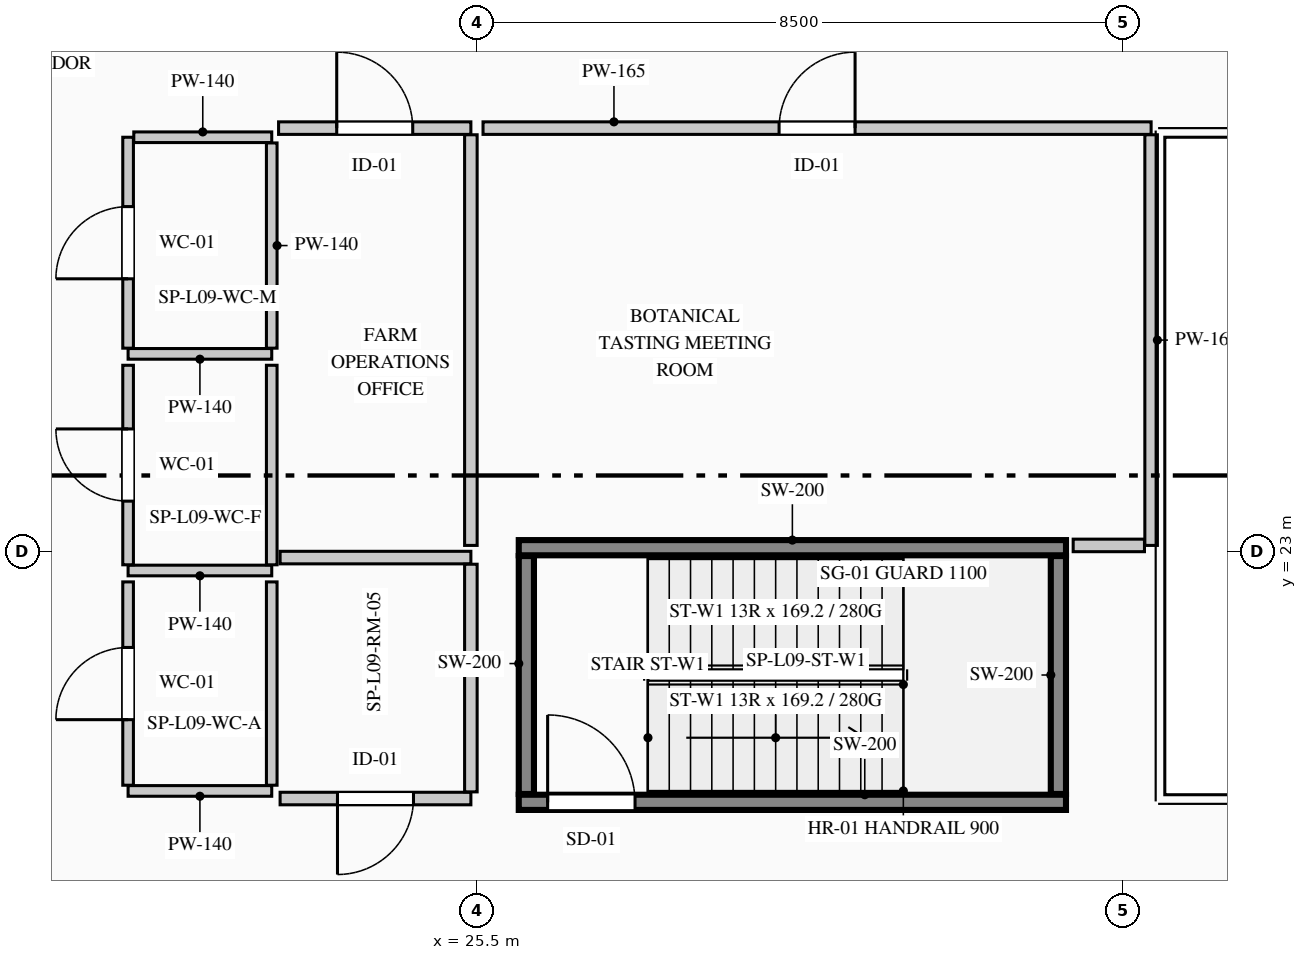
"""IFC4 building model, lengths in metres.
Left out: names, types, materials, properties, quantities, classifications, styles, units other than length and angle.
Written with IfcOpenShell. Run it as: python <this file> out.ifc"""

import sys

from ifc_helpers import new_model, si_unit, direction, frame, frame_2d, origin, place, context, subcontext, project, spatial, rectangle, extrude, element, fill, save


model = new_model("IFC4")
c1 = context("Model", 3, precision=1e-05, world=origin(), true_north=direction((0.0, 1.0)))
c2 = subcontext(c1, "Body", "Model", "MODEL_VIEW")
j1 = project(units=[si_unit("LENGTHUNIT", "METRE"), si_unit("PLANEANGLEUNIT", "RADIAN")], contexts=[c1])
p1 = place(None, origin())
s1 = spatial("IfcSite", under=j1, at=p1, CompositionType="ELEMENT")
p2 = place(p1, origin())
s2 = spatial("IfcBuilding", under=s1, at=p2, CompositionType="ELEMENT")
p3 = place(p2, frame((0.0, 0.0, 40.2)))
s3 = spatial("IfcBuildingStorey", under=s2, at=p3, CompositionType="ELEMENT", Elevation=40.2)
p4 = place(p3, frame((26.05, 19.7, 0.0), z_axis=(0.0, 0.0, 1.0), x_axis=(1.0, 0.0, 0.0)))
e1 = element("IfcWall", 1, at=p4, inside=s3, PredefinedType="SHEAR", context=c2, shape_type="SweptSolid", body=[
    extrude(rectangle(XDim=7.2, YDim=0.2, at=frame_2d((3.6, 0.0))), origin(), (0.0, 0.0, 1.0), 4.4),
])
p5 = place(p4, frame((0.38, 0.0, 0.0)))
e2 = element("IfcOpeningElement", 2, at=p5, cuts=e1, PredefinedType="OPENING", context=c2, shape_type="SweptSolid", body=[
    extrude(rectangle(XDim=1.15, YDim=2.2, at=frame_2d((0.575, 1.1))), frame((0.0, 0.11, 0.0), z_axis=(0.0, -1.0, 0.0), x_axis=(1.0, 0.0, 0.0)), (0.0, 0.0, 1.0), 0.22),
])
p6 = place(p3, frame((26.05, 23.05, 0.0), z_axis=(0.0, 0.0, 1.0), x_axis=(1.0, 0.0, 0.0)))
e3 = element("IfcWall", 3, at=p6, inside=s3, PredefinedType="SHEAR", context=c2, shape_type="SweptSolid", body=[
    extrude(rectangle(XDim=7.2, YDim=0.2, at=frame_2d((3.6, 0.0))), origin(), (0.0, 0.0, 1.0), 4.4),
])
for number, where, z_axis, x_axis in (
    (4, (26.15, 19.81, 0.0), (0.0, 0.0, 1.0), (0.0, 1.0, 0.0)),
    (5, (33.15, 19.81, 0.0), (0.0, 0.0, 1.0), (0.0, 1.0, 0.0)),
):
    element("IfcWall", number, at=place(p3, frame(where, z_axis=z_axis, x_axis=x_axis)), inside=s3, PredefinedType="SHEAR", context=c2, shape_type="SweptSolid", body=[
        extrude(rectangle(XDim=3.13, YDim=0.2, at=frame_2d((1.565, 0.0))), origin(), (0.0, 0.0, 1.0), 4.4),
    ])
p7 = place(p3, frame((22.8, 25.6, 0.0), z_axis=(0.0, 0.0, 1.0), x_axis=(-1.0, 0.0, 0.0)))
e6 = element("IfcWall", 6, at=p7, inside=s3, PredefinedType="PARTITIONING", context=c2, shape_type="SweptSolid", body=[
    extrude(rectangle(XDim=1.89, YDim=0.14, at=frame_2d((0.945, 0.0))), origin(), (0.0, 0.0, 1.0), 4.1),
])
p8 = place(p3, frame((20.91, 25.675, 0.0), z_axis=(0.0, 0.0, 1.0), x_axis=(0.0, 1.0, 0.0)))
e7 = element("IfcWall", 7, at=p8, inside=s3, PredefinedType="PARTITIONING", context=c2, shape_type="SweptSolid", body=[
    extrude(rectangle(XDim=2.775, YDim=0.14, at=frame_2d((1.387, 0.0))), origin(), (0.0, 0.0, 1.0), 4.1),
])
p9 = place(p8, frame((0.913, 0.0, 0.0)))
e8 = element("IfcOpeningElement", 8, at=p9, cuts=e7, PredefinedType="OPENING", context=c2, shape_type="SweptSolid", body=[
    extrude(rectangle(XDim=0.95, YDim=2.15, at=frame_2d((0.475, 1.075))), frame((0.0, 0.08, 0.0), z_axis=(0.0, -1.0, 0.0), x_axis=(1.0, 0.0, 0.0)), (0.0, 0.0, 1.0), 0.16),
])
p10 = place(p3, frame((20.985, 28.45, 0.0), z_axis=(0.0, 0.0, 1.0), x_axis=(1.0, 0.0, 0.0)))
e9 = element("IfcWall", 9, at=p10, inside=s3, PredefinedType="PARTITIONING", context=c2, shape_type="SweptSolid", body=[
    extrude(rectangle(XDim=1.815, YDim=0.14, at=frame_2d((0.907, 0.0))), origin(), (0.0, 0.0, 1.0), 4.1),
])
p11 = place(p3, frame((22.8, 28.375, 0.0), z_axis=(0.0, 0.0, 1.0), x_axis=(0.0, -1.0, 0.0)))
e10 = element("IfcWall", 10, at=p11, inside=s3, PredefinedType="PARTITIONING", context=c2, shape_type="SweptSolid", body=[
    extrude(rectangle(XDim=2.7, YDim=0.14, at=frame_2d((1.35, 0.0))), origin(), (0.0, 0.0, 1.0), 3.785),
])
p12 = place(p3, frame((22.8, 22.75, 0.0), z_axis=(0.0, 0.0, 1.0), x_axis=(-1.0, 0.0, 0.0)))
e11 = element("IfcWall", 11, at=p12, inside=s3, PredefinedType="PARTITIONING", context=c2, shape_type="SweptSolid", body=[
    extrude(rectangle(XDim=1.89, YDim=0.14, at=frame_2d((0.945, 0.0))), origin(), (0.0, 0.0, 1.0), 4.1),
])
p13 = place(p3, frame((20.91, 22.825, 0.0), z_axis=(0.0, 0.0, 1.0), x_axis=(0.0, 1.0, 0.0)))
e12 = element("IfcWall", 12, at=p13, inside=s3, PredefinedType="PARTITIONING", context=c2, shape_type="SweptSolid", body=[
    extrude(rectangle(XDim=2.625, YDim=0.14, at=frame_2d((1.312, 0.0))), origin(), (0.0, 0.0, 1.0), 4.1),
])
p14 = place(p13, frame((0.837, 0.0, 0.0)))
e13 = element("IfcOpeningElement", 13, at=p14, cuts=e12, PredefinedType="OPENING", context=c2, shape_type="SweptSolid", body=[
    extrude(rectangle(XDim=0.95, YDim=2.15, at=frame_2d((0.475, 1.075))), frame((0.0, 0.08, 0.0), z_axis=(0.0, -1.0, 0.0), x_axis=(1.0, 0.0, 0.0)), (0.0, 0.0, 1.0), 0.16),
])
p15 = place(p3, frame((22.8, 25.45, 0.0), z_axis=(0.0, 0.0, 1.0), x_axis=(0.0, -1.0, 0.0)))
e14 = element("IfcWall", 14, at=p15, inside=s3, PredefinedType="PARTITIONING", context=c2, shape_type="SweptSolid", body=[
    extrude(rectangle(XDim=2.625, YDim=0.14, at=frame_2d((1.312, 0.0))), origin(), (0.0, 0.0, 1.0), 3.785),
])
p16 = place(p3, frame((22.8, 19.85, 0.0), z_axis=(0.0, 0.0, 1.0), x_axis=(-1.0, 0.0, 0.0)))
e15 = element("IfcWall", 15, at=p16, inside=s3, PredefinedType="PARTITIONING", context=c2, shape_type="SweptSolid", body=[
    extrude(rectangle(XDim=1.89, YDim=0.14, at=frame_2d((0.945, 0.0))), origin(), (0.0, 0.0, 1.0), 4.1),
])
p17 = place(p3, frame((20.91, 19.925, 0.0), z_axis=(0.0, 0.0, 1.0), x_axis=(0.0, 1.0, 0.0)))
e16 = element("IfcWall", 16, at=p17, inside=s3, PredefinedType="PARTITIONING", context=c2, shape_type="SweptSolid", body=[
    extrude(rectangle(XDim=2.675, YDim=0.14, at=frame_2d((1.337, 0.0))), origin(), (0.0, 0.0, 1.0), 4.1),
])
p18 = place(p17, frame((0.863, 0.0, 0.0)))
e17 = element("IfcOpeningElement", 17, at=p18, cuts=e16, PredefinedType="OPENING", context=c2, shape_type="SweptSolid", body=[
    extrude(rectangle(XDim=0.95, YDim=2.15, at=frame_2d((0.475, 1.075))), frame((0.0, 0.08, 0.0), z_axis=(0.0, -1.0, 0.0), x_axis=(1.0, 0.0, 0.0)), (0.0, 0.0, 1.0), 0.16),
])
p19 = place(p3, frame((22.8, 22.6, 0.0), z_axis=(0.0, 0.0, 1.0), x_axis=(0.0, -1.0, 0.0)))
e18 = element("IfcWall", 18, at=p19, inside=s3, PredefinedType="PARTITIONING", context=c2, shape_type="SweptSolid", body=[
    extrude(rectangle(XDim=2.675, YDim=0.14, at=frame_2d((1.337, 0.0))), origin(), (0.0, 0.0, 1.0), 3.785),
])
p20 = place(p3, frame((25.42, 19.75, 0.0), z_axis=(0.0, 0.0, 1.0), x_axis=(-1.0, 0.0, 0.0)))
e19 = element("IfcWall", 19, at=p20, inside=s3, PredefinedType="PARTITIONING", context=c2, shape_type="SweptSolid", body=[
    extrude(rectangle(XDim=2.51, YDim=0.165, at=frame_2d((1.255, 0.0))), origin(), (0.0, 0.0, 1.0), 4.1),
])
p21 = place(p20, frame((0.755, 0.0, 0.0)))
e20 = element("IfcOpeningElement", 20, at=p21, cuts=e19, PredefinedType="OPENING", context=c2, shape_type="SweptSolid", body=[
    extrude(rectangle(XDim=1.0, YDim=2.15, at=frame_2d((0.5, 1.075))), frame((0.0, 0.093, 0.0), z_axis=(0.0, -1.0, 0.0), x_axis=(1.0, 0.0, 0.0)), (0.0, 0.0, 1.0), 0.185),
])
p22 = place(p3, frame((22.91, 22.92, 0.0), z_axis=(0.0, 0.0, 1.0), x_axis=(1.0, 0.0, 0.0)))
e21 = element("IfcWall", 21, at=p22, inside=s3, PredefinedType="PARTITIONING", context=c2, shape_type="SweptSolid", body=[
    extrude(rectangle(XDim=2.51, YDim=0.165, at=frame_2d((1.255, 0.0))), origin(), (0.0, 0.0, 1.0), 4.1),
])
p23 = place(p3, frame((25.42, 22.833, 0.0), z_axis=(0.0, 0.0, 1.0), x_axis=(0.0, -1.0, 0.0)))
e22 = element("IfcWall", 22, at=p23, inside=s3, PredefinedType="PARTITIONING", context=c2, shape_type="SweptSolid", body=[
    extrude(rectangle(XDim=2.995, YDim=0.165, at=frame_2d((1.498, 0.0))), origin(), (0.0, 0.0, 1.0), 3.285),
])
p24 = place(p3, frame((22.89, 28.57, 0.0), z_axis=(0.0, 0.0, 1.0), x_axis=(1.0, 0.0, 0.0)))
e23 = element("IfcWall", 23, at=p24, inside=s3, PredefinedType="PARTITIONING", context=c2, shape_type="SweptSolid", body=[
    extrude(rectangle(XDim=2.53, YDim=0.165, at=frame_2d((1.265, 0.0))), origin(), (0.0, 0.0, 1.0), 4.1),
])
p25 = place(p24, frame((0.765, 0.0, 0.0)))
e24 = element("IfcOpeningElement", 24, at=p25, cuts=e23, PredefinedType="OPENING", context=c2, shape_type="SweptSolid", body=[
    extrude(rectangle(XDim=1.0, YDim=2.15, at=frame_2d((0.5, 1.075))), frame((0.0, 0.093, 0.0), z_axis=(0.0, -1.0, 0.0), x_axis=(1.0, 0.0, 0.0)), (0.0, 0.0, 1.0), 0.185),
])
p26 = place(p3, frame((25.42, 28.482, 0.0), z_axis=(0.0, 0.0, 1.0), x_axis=(0.0, -1.0, 0.0)))
e25 = element("IfcWall", 25, at=p26, inside=s3, PredefinedType="PARTITIONING", context=c2, shape_type="SweptSolid", body=[
    extrude(rectangle(XDim=5.402, YDim=0.165, at=frame_2d((2.701, 0.0))), origin(), (0.0, 0.0, 1.0), 3.285),
])
p27 = place(p3, frame((25.58, 28.57, 0.0), z_axis=(0.0, 0.0, 1.0), x_axis=(1.0, 0.0, 0.0)))
e26 = element("IfcWall", 26, at=p27, inside=s3, PredefinedType="PARTITIONING", context=c2, shape_type="SweptSolid", body=[
    extrude(rectangle(XDim=8.79, YDim=0.165, at=frame_2d((4.395, 0.0))), origin(), (0.0, 0.0, 1.0), 3.785),
])
p28 = place(p27, frame((3.895, 0.0, 0.0)))
e27 = element("IfcOpeningElement", 27, at=p28, cuts=e26, PredefinedType="OPENING", context=c2, shape_type="SweptSolid", body=[
    extrude(rectangle(XDim=1.0, YDim=2.15, at=frame_2d((0.5, 1.075))), frame((0.0, 0.093, 0.0), z_axis=(0.0, -1.0, 0.0), x_axis=(1.0, 0.0, 0.0)), (0.0, 0.0, 1.0), 0.185),
])
p29 = place(p3, frame((34.37, 28.482, 0.0), z_axis=(0.0, 0.0, 1.0), x_axis=(0.0, -1.0, 0.0)))
e28 = element("IfcWall", 28, at=p29, inside=s3, PredefinedType="PARTITIONING", context=c2, shape_type="SweptSolid", body=[
    extrude(rectangle(XDim=5.402, YDim=0.165, at=frame_2d((2.701, 0.0))), origin(), (0.0, 0.0, 1.0), 4.1),
])
p30 = place(p3, frame((34.282, 23.08, 0.0), z_axis=(0.0, 0.0, 1.0), x_axis=(-1.0, 0.0, 0.0)))
e29 = element("IfcWall", 29, at=p30, inside=s3, PredefinedType="PARTITIONING", context=c2, shape_type="SweptSolid", body=[
    extrude(rectangle(XDim=0.938, YDim=0.165, at=frame_2d((0.469, 0.0))), origin(), (0.0, 0.0, 1.0), 4.1),
])
p31 = place(p5, origin())
e30 = element("IfcDoor", 30, at=p31, inside=s3, OperationType="SINGLE_SWING_LEFT", PredefinedType="DOOR", context=c2, shape_type="SweptSolid", body=[
    extrude(rectangle(XDim=1.15, YDim=2.2, at=frame_2d((0.575, 1.1))), frame((0.0, 0.025, 0.0), z_axis=(0.0, -1.0, 0.0), x_axis=(1.0, 0.0, 0.0)), (0.0, 0.0, 1.0), 0.05),
])
fill(e2, e30)
p32 = place(p9, origin())
e31 = element("IfcDoor", 31, at=p32, inside=s3, OperationType="SINGLE_SWING_LEFT", PredefinedType="DOOR", context=c2, shape_type="SweptSolid", body=[
    extrude(rectangle(XDim=0.95, YDim=2.15, at=frame_2d((0.475, 1.075))), frame((0.0, 0.025, 0.0), z_axis=(0.0, -1.0, 0.0), x_axis=(1.0, 0.0, 0.0)), (0.0, 0.0, 1.0), 0.05),
])
fill(e8, e31)
p33 = place(p14, origin())
e32 = element("IfcDoor", 32, at=p33, inside=s3, OperationType="SINGLE_SWING_RIGHT", PredefinedType="DOOR", context=c2, shape_type="SweptSolid", body=[
    extrude(rectangle(XDim=0.95, YDim=2.15, at=frame_2d((0.475, 1.075))), frame((0.0, 0.025, 0.0), z_axis=(0.0, -1.0, 0.0), x_axis=(1.0, 0.0, 0.0)), (0.0, 0.0, 1.0), 0.05),
])
fill(e13, e32)
p34 = place(p18, origin())
e33 = element("IfcDoor", 33, at=p34, inside=s3, OperationType="SINGLE_SWING_LEFT", PredefinedType="DOOR", context=c2, shape_type="SweptSolid", body=[
    extrude(rectangle(XDim=0.95, YDim=2.15, at=frame_2d((0.475, 1.075))), frame((0.0, 0.025, 0.0), z_axis=(0.0, -1.0, 0.0), x_axis=(1.0, 0.0, 0.0)), (0.0, 0.0, 1.0), 0.05),
])
fill(e17, e33)
p35 = place(p21, origin())
e34 = element("IfcDoor", 34, at=p35, inside=s3, OperationType="SINGLE_SWING_RIGHT", PredefinedType="DOOR", context=c2, shape_type="SweptSolid", body=[
    extrude(rectangle(XDim=1.0, YDim=2.15, at=frame_2d((0.5, 1.075))), frame((0.0, 0.025, 0.0), z_axis=(0.0, -1.0, 0.0), x_axis=(1.0, 0.0, 0.0)), (0.0, 0.0, 1.0), 0.05),
])
fill(e20, e34)
p36 = place(p25, origin())
e35 = element("IfcDoor", 35, at=p36, inside=s3, OperationType="SINGLE_SWING_LEFT", PredefinedType="DOOR", context=c2, shape_type="SweptSolid", body=[
    extrude(rectangle(XDim=1.0, YDim=2.15, at=frame_2d((0.5, 1.075))), frame((0.0, 0.025, 0.0), z_axis=(0.0, -1.0, 0.0), x_axis=(1.0, 0.0, 0.0)), (0.0, 0.0, 1.0), 0.05),
])
fill(e24, e35)
p37 = place(p28, origin())
e36 = element("IfcDoor", 36, at=p37, inside=s3, OperationType="SINGLE_SWING_RIGHT", PredefinedType="DOOR", context=c2, shape_type="SweptSolid", body=[
    extrude(rectangle(XDim=1.0, YDim=2.15, at=frame_2d((0.5, 1.075))), frame((0.0, 0.025, 0.0), z_axis=(0.0, -1.0, 0.0), x_axis=(1.0, 0.0, 0.0)), (0.0, 0.0, 1.0), 0.05),
])
fill(e27, e36)
save(model, sys.argv[1])
